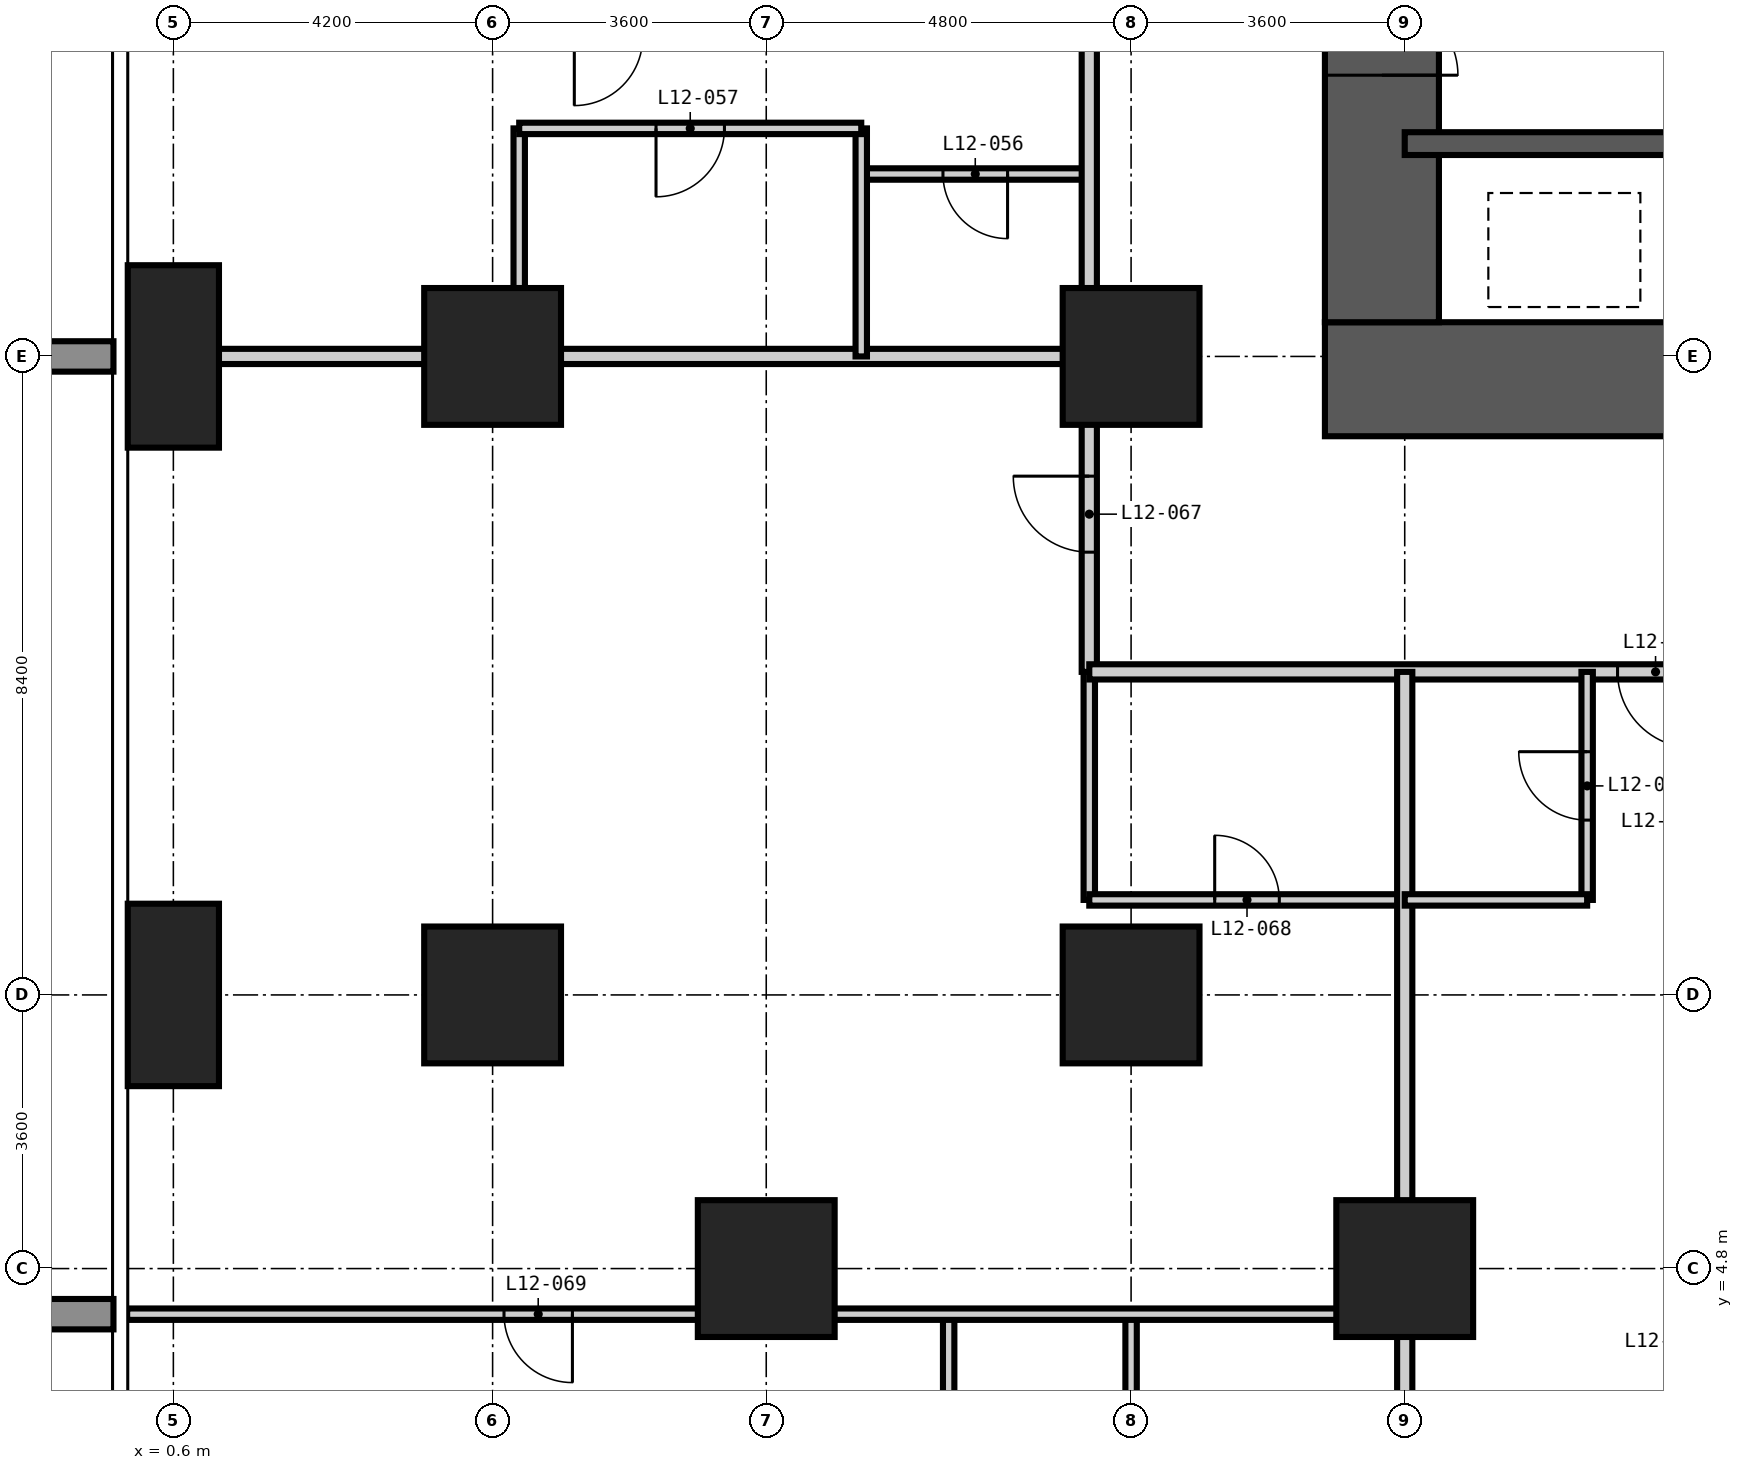
"""IFC4 building model, lengths in metres.
Left out: names, types, materials, properties, quantities, classifications, styles, units other than length and angle.
Written with IfcOpenShell. Run it as: python <this file> out.ifc"""

import sys

from ifc_helpers import new_model, si_unit, direction, frame, frame_2d, origin, origin_2d, place, context, subcontext, project, spatial, rectangle, extrude, element, fill, save


model = new_model("IFC4")
c1 = context("Model", 3, precision=1e-05, world=origin(), true_north=direction((0.0, 1.0)))
c2 = subcontext(c1, "Body", "Model", "MODEL_VIEW")
j1 = project(units=[si_unit("LENGTHUNIT", "METRE"), si_unit("PLANEANGLEUNIT", "RADIAN")], contexts=[c1])
p1 = place(None, origin())
s1 = spatial("IfcSite", under=j1, at=p1, CompositionType="ELEMENT")
p2 = place(p1, origin())
s2 = spatial("IfcBuilding", under=s1, at=p2, CompositionType="ELEMENT")
p3 = place(p2, frame((0.0, 0.0, 52.2)))
s3 = spatial("IfcBuildingStorey", under=s2, at=p3, CompositionType="ELEMENT", Elevation=52.2)
for number, where, z_axis, x_axis in (
    (1, (0.6, 8.4, -0.35), (0.0, 0.0, 1.0), (1.0, 0.0, 0.0)),
    (2, (0.6, 16.8, -0.35), (0.0, 0.0, 1.0), (1.0, 0.0, 0.0)),
):
    element("IfcColumn", number, at=place(p3, frame(where, z_axis=z_axis, x_axis=x_axis)), inside=s3, PredefinedType="COLUMN", context=c2, shape_type="SweptSolid", body=[
        extrude(rectangle(XDim=1.2, YDim=2.4, at=origin_2d()), origin(), (0.0, 0.0, 1.0), 3.6),
    ])
for number, where, z_axis, x_axis in (
    (3, (4.8, 8.4, -0.35), (0.0, 0.0, 1.0), (1.0, 0.0, 0.0)),
    (4, (4.8, 16.8, -0.35), (0.0, 0.0, 1.0), (1.0, 0.0, 0.0)),
    (5, (8.4, 4.8, -0.35), (0.0, 0.0, 1.0), (1.0, 0.0, 0.0)),
    (6, (13.2, 8.4, -0.35), (0.0, 0.0, 1.0), (1.0, 0.0, 0.0)),
    (7, (13.2, 16.8, -0.35), (0.0, 0.0, 1.0), (1.0, 0.0, 0.0)),
    (8, (16.8, 4.8, -0.35), (0.0, 0.0, 1.0), (1.0, 0.0, 0.0)),
):
    element("IfcColumn", number, at=place(p3, frame(where, z_axis=z_axis, x_axis=x_axis)), inside=s3, PredefinedType="COLUMN", context=c2, shape_type="SweptSolid", body=[
        extrude(rectangle(XDim=1.8, YDim=1.8, at=origin_2d()), origin(), (0.0, 0.0, 1.0), 3.6),
    ])
p4 = place(p3, frame((15.75, 16.5, -0.35), z_axis=(0.0, 0.0, 1.0), x_axis=(1.0, 0.0, 0.0)))
e9 = element("IfcWall", 9, at=p4, inside=s3, PredefinedType="SHEAR", context=c2, shape_type="SweptSolid", body=[
    extrude(rectangle(XDim=27.3, YDim=1.5, at=frame_2d((13.65, 0.0))), origin(), (0.0, 0.0, 1.0), 3.6),
])
p5 = place(p4, frame((13.15, 0.0, 0.35)))
e10 = element("IfcOpeningElement", 10, at=p5, cuts=e9, PredefinedType="OPENING", context=c2, shape_type="SweptSolid", body=[
    extrude(rectangle(XDim=1.0, YDim=2.1, at=frame_2d((0.5, 1.05))), frame((0.0, 0.76, 0.0), z_axis=(0.0, -1.0, 0.0), x_axis=(1.0, 0.0, 0.0)), (0.0, 0.0, 1.0), 1.52),
])
p6 = place(p4, frame((19.45, 0.0, 0.35)))
e11 = element("IfcOpeningElement", 11, at=p6, cuts=e9, PredefinedType="OPENING", context=c2, shape_type="SweptSolid", body=[
    extrude(rectangle(XDim=1.0, YDim=2.1, at=frame_2d((0.5, 1.05))), frame((0.0, 0.76, 0.0), z_axis=(0.0, -1.0, 0.0), x_axis=(1.0, 0.0, 0.0)), (0.0, 0.0, 1.0), 1.52),
])
p7 = place(p3, frame((16.5, 41.55, -0.35), z_axis=(0.0, 0.0, 1.0), x_axis=(0.0, -1.0, 0.0)))
e12 = element("IfcWall", 12, at=p7, inside=s3, PredefinedType="SHEAR", context=c2, shape_type="SweptSolid", body=[
    extrude(rectangle(XDim=24.3, YDim=1.5, at=frame_2d((12.15, 0.0))), origin(), (0.0, 0.0, 1.0), 3.6),
])
p8 = place(p7, frame((11.25, 0.0, 0.35)))
e13 = element("IfcOpeningElement", 13, at=p8, cuts=e12, PredefinedType="OPENING", context=c2, shape_type="SweptSolid", body=[
    extrude(rectangle(XDim=1.8, YDim=2.2, at=frame_2d((0.9, 1.1))), frame((0.0, 0.76, 0.0), z_axis=(0.0, -1.0, 0.0), x_axis=(1.0, 0.0, 0.0)), (0.0, 0.0, 1.0), 1.52),
])
p9 = place(p7, frame((20.05, 0.0, 0.35)))
e14 = element("IfcOpeningElement", 14, at=p9, cuts=e12, PredefinedType="OPENING", context=c2, shape_type="SweptSolid", body=[
    extrude(rectangle(XDim=1.0, YDim=2.1, at=frame_2d((0.5, 1.05))), frame((0.0, 0.76, 0.0), z_axis=(0.0, -1.0, 0.0), x_axis=(1.0, 0.0, 0.0)), (0.0, 0.0, 1.0), 1.52),
])
p10 = place(p7, frame((5.35, 0.0, 0.35)))
e15 = element("IfcOpeningElement", 15, at=p10, cuts=e12, PredefinedType="OPENING", context=c2, shape_type="SweptSolid", body=[
    extrude(rectangle(XDim=1.0, YDim=2.1, at=frame_2d((0.5, 1.05))), frame((0.0, 0.76, 0.0), z_axis=(0.0, -1.0, 0.0), x_axis=(1.0, 0.0, 0.0)), (0.0, 0.0, 1.0), 1.52),
])
p11 = place(p3, frame((16.8, 19.6, -0.35), z_axis=(0.0, 0.0, 1.0), x_axis=(1.0, 0.0, 0.0)))
e16 = element("IfcWall", 16, at=p11, inside=s3, PredefinedType="SHEAR", context=c2, shape_type="SweptSolid", body=[
    extrude(rectangle(XDim=8.4, YDim=0.3, at=frame_2d((4.2, 0.0))), origin(), (0.0, 0.0, 1.0), 3.6),
])
p12 = place(p3, frame((12.65, 9.65, 0.0), z_axis=(0.0, 0.0, 1.0), x_axis=(0.0, 1.0, 0.0)))
e17 = element("IfcWall", 17, at=p12, inside=s3, PredefinedType="PARTITIONING", context=c2, shape_type="SweptSolid", body=[
    extrude(rectangle(XDim=3.0, YDim=0.15, at=frame_2d((1.5, 0.0))), origin(), (0.0, 0.0, 1.0), 3.25),
])
p13 = place(p3, frame((12.65, 9.65, 0.0), z_axis=(0.0, 0.0, 1.0), x_axis=(1.0, 0.0, 0.0)))
e18 = element("IfcWall", 18, at=p13, inside=s3, PredefinedType="PARTITIONING", context=c2, shape_type="SweptSolid", body=[
    extrude(rectangle(XDim=4.15, YDim=0.15, at=frame_2d((2.075, 0.0))), origin(), (0.0, 0.0, 1.0), 3.25),
])
p14 = place(p13, frame((1.65, 0.0, 0.0)))
e19 = element("IfcOpeningElement", 19, at=p14, cuts=e18, PredefinedType="OPENING", context=c2, shape_type="SweptSolid", body=[
    extrude(rectangle(XDim=0.85, YDim=2.1, at=frame_2d((0.425, 1.05))), frame((0.0, 0.085, 0.0), z_axis=(0.0, -1.0, 0.0), x_axis=(1.0, 0.0, 0.0)), (0.0, 0.0, 1.0), 0.17),
])
p15 = place(p3, frame((9.65, 19.2, 0.0), z_axis=(0.0, 0.0, 1.0), x_axis=(1.0, 0.0, 0.0)))
e20 = element("IfcWall", 20, at=p15, inside=s3, PredefinedType="PARTITIONING", context=c2, shape_type="SweptSolid", body=[
    extrude(rectangle(XDim=3.0, YDim=0.15, at=frame_2d((1.5, 0.0))), origin(), (0.0, 0.0, 1.0), 3.25),
])
p16 = place(p15, frame((1.075, 0.0, 0.0)))
e21 = element("IfcOpeningElement", 21, at=p16, cuts=e20, PredefinedType="OPENING", context=c2, shape_type="SweptSolid", body=[
    extrude(rectangle(XDim=0.85, YDim=2.1, at=frame_2d((0.425, 1.05))), frame((0.0, 0.085, 0.0), z_axis=(0.0, -1.0, 0.0), x_axis=(1.0, 0.0, 0.0)), (0.0, 0.0, 1.0), 0.17),
])
p17 = place(p3, frame((12.65, 12.65, 0.0), z_axis=(0.0, 0.0, 1.0), x_axis=(0.0, 1.0, 0.0)))
e22 = element("IfcWall", 22, at=p17, inside=s3, PredefinedType="PARTITIONING", context=c2, shape_type="SweptSolid", body=[
    extrude(rectangle(XDim=32.9, YDim=0.2, at=frame_2d((16.45, 0.0))), origin(), (0.0, 0.0, 1.0), 3.25),
])
p18 = place(p17, frame((8.75, 0.0, 0.0)))
e23 = element("IfcOpeningElement", 23, at=p18, cuts=e22, PredefinedType="OPENING", context=c2, shape_type="SweptSolid", body=[
    extrude(rectangle(XDim=1.0, YDim=2.2, at=frame_2d((0.5, 1.1))), frame((0.0, 0.11, 0.0), z_axis=(0.0, -1.0, 0.0), x_axis=(1.0, 0.0, 0.0)), (0.0, 0.0, 1.0), 0.22),
])
p19 = place(p17, frame((17.0, 0.0, 0.0)))
e24 = element("IfcOpeningElement", 24, at=p19, cuts=e22, PredefinedType="OPENING", context=c2, shape_type="SweptSolid", body=[
    extrude(rectangle(XDim=1.0, YDim=2.2, at=frame_2d((0.5, 1.1))), frame((0.0, 0.11, 0.0), z_axis=(0.0, -1.0, 0.0), x_axis=(1.0, 0.0, 0.0)), (0.0, 0.0, 1.0), 0.22),
])
p20 = place(p17, frame((23.9, 0.0, 0.0)))
e25 = element("IfcOpeningElement", 25, at=p20, cuts=e22, PredefinedType="OPENING", context=c2, shape_type="SweptSolid", body=[
    extrude(rectangle(XDim=1.0, YDim=2.2, at=frame_2d((0.5, 1.1))), frame((0.0, 0.11, 0.0), z_axis=(0.0, -1.0, 0.0), x_axis=(1.0, 0.0, 0.0)), (0.0, 0.0, 1.0), 0.22),
])
p21 = place(p17, frame((25.4, 0.0, 0.0)))
e26 = element("IfcOpeningElement", 26, at=p21, cuts=e22, PredefinedType="OPENING", context=c2, shape_type="SweptSolid", body=[
    extrude(rectangle(XDim=1.0, YDim=2.2, at=frame_2d((0.5, 1.1))), frame((0.0, 0.11, 0.0), z_axis=(0.0, -1.0, 0.0), x_axis=(1.0, 0.0, 0.0)), (0.0, 0.0, 1.0), 0.22),
])
p22 = place(p17, frame((1.575, 0.0, 0.0)))
e27 = element("IfcOpeningElement", 27, at=p22, cuts=e22, PredefinedType="OPENING", context=c2, shape_type="SweptSolid", body=[
    extrude(rectangle(XDim=1.0, YDim=2.2, at=frame_2d((0.5, 1.1))), frame((0.0, 0.11, 0.0), z_axis=(0.0, -1.0, 0.0), x_axis=(1.0, 0.0, 0.0)), (0.0, 0.0, 1.0), 0.22),
])
p23 = place(p17, frame((30.625, 0.0, 0.0)))
e28 = element("IfcOpeningElement", 28, at=p23, cuts=e22, PredefinedType="OPENING", context=c2, shape_type="SweptSolid", body=[
    extrude(rectangle(XDim=1.0, YDim=2.2, at=frame_2d((0.5, 1.1))), frame((0.0, 0.11, 0.0), z_axis=(0.0, -1.0, 0.0), x_axis=(1.0, 0.0, 0.0)), (0.0, 0.0, 1.0), 0.22),
])
p24 = place(p3, frame((44.95, 12.65, 0.0), z_axis=(0.0, 0.0, 1.0), x_axis=(-1.0, 0.0, 0.0)))
e29 = element("IfcWall", 29, at=p24, inside=s3, PredefinedType="PARTITIONING", context=c2, shape_type="SweptSolid", body=[
    extrude(rectangle(XDim=32.3, YDim=0.2, at=frame_2d((16.15, 0.0))), origin(), (0.0, 0.0, 1.0), 3.25),
])
p25 = place(p24, frame((24.35, 0.0, 0.0)))
e30 = element("IfcOpeningElement", 30, at=p25, cuts=e29, PredefinedType="OPENING", context=c2, shape_type="SweptSolid", body=[
    extrude(rectangle(XDim=1.0, YDim=2.2, at=frame_2d((0.5, 1.1))), frame((0.0, 0.11, 0.0), z_axis=(0.0, -1.0, 0.0), x_axis=(1.0, 0.0, 0.0)), (0.0, 0.0, 1.0), 0.22),
])
p26 = place(p24, frame((15.95, 0.0, 0.0)))
e31 = element("IfcOpeningElement", 31, at=p26, cuts=e29, PredefinedType="OPENING", context=c2, shape_type="SweptSolid", body=[
    extrude(rectangle(XDim=1.0, YDim=2.2, at=frame_2d((0.5, 1.1))), frame((0.0, 0.11, 0.0), z_axis=(0.0, -1.0, 0.0), x_axis=(1.0, 0.0, 0.0)), (0.0, 0.0, 1.0), 0.22),
])
p27 = place(p24, frame((7.55, 0.0, 0.0)))
e32 = element("IfcOpeningElement", 32, at=p27, cuts=e29, PredefinedType="OPENING", context=c2, shape_type="SweptSolid", body=[
    extrude(rectangle(XDim=1.0, YDim=2.2, at=frame_2d((0.5, 1.1))), frame((0.0, 0.11, 0.0), z_axis=(0.0, -1.0, 0.0), x_axis=(1.0, 0.0, 0.0)), (0.0, 0.0, 1.0), 0.22),
])
for number, where, z_axis, x_axis in (
    (33, (16.8, -0.008, 0.0), (0.0, 0.0, 1.0), (0.0, 1.0, 0.0)),
    (34, (-0.008, 16.8, 0.0), (0.0, 0.0, 1.0), (1.0, 0.0, 0.0)),
):
    element("IfcWall", number, at=place(p3, frame(where, z_axis=z_axis, x_axis=x_axis)), inside=s3, PredefinedType="PARTITIONING", context=c2, shape_type="SweptSolid", body=[
        extrude(rectangle(XDim=12.658, YDim=0.2, at=frame_2d((6.329, 0.0))), origin(), (0.0, 0.0, 1.0), 3.25),
    ])
for number, where, z_axis, x_axis in (
    (35, (5.15, 16.8, 0.0), (0.0, 0.0, 1.0), (0.0, 1.0, 0.0)),
    (36, (9.65, 16.8, 0.0), (0.0, 0.0, 1.0), (0.0, 1.0, 0.0)),
):
    element("IfcWall", number, at=place(p3, frame(where, z_axis=z_axis, x_axis=x_axis)), inside=s3, PredefinedType="PARTITIONING", context=c2, shape_type="SweptSolid", body=[
        extrude(rectangle(XDim=3.0, YDim=0.15, at=frame_2d((1.5, 0.0))), origin(), (0.0, 0.0, 1.0), 3.25),
    ])
p28 = place(p3, frame((10.8, 1.2, 0.0), z_axis=(0.0, 0.0, 1.0), x_axis=(0.0, 1.0, 0.0)))
e37 = element("IfcWall", 37, at=p28, inside=s3, PredefinedType="PARTITIONING", context=c2, shape_type="SweptSolid", body=[
    extrude(rectangle(XDim=3.0, YDim=0.15, at=frame_2d((1.5, 0.0))), origin(), (0.0, 0.0, 1.0), 3.25),
])
p29 = place(p28, frame((1.05, 0.0, 0.0)))
e38 = element("IfcOpeningElement", 38, at=p29, cuts=e37, PredefinedType="OPENING", context=c2, shape_type="SweptSolid", body=[
    extrude(rectangle(XDim=0.9, YDim=2.1, at=frame_2d((0.45, 1.05))), frame((0.0, 0.085, 0.0), z_axis=(0.0, -1.0, 0.0), x_axis=(1.0, 0.0, 0.0)), (0.0, 0.0, 1.0), 0.17),
])
p30 = place(p3, frame((13.2, 1.2, 0.0), z_axis=(0.0, 0.0, 1.0), x_axis=(0.0, 1.0, 0.0)))
e39 = element("IfcWall", 39, at=p30, inside=s3, PredefinedType="PARTITIONING", context=c2, shape_type="SweptSolid", body=[
    extrude(rectangle(XDim=3.0, YDim=0.15, at=frame_2d((1.5, 0.0))), origin(), (0.0, 0.0, 1.0), 3.25),
])
p31 = place(p3, frame((19.2, 9.65, 0.0), z_axis=(0.0, 0.0, 1.0), x_axis=(0.0, 1.0, 0.0)))
e40 = element("IfcWall", 40, at=p31, inside=s3, PredefinedType="PARTITIONING", context=c2, shape_type="SweptSolid", body=[
    extrude(rectangle(XDim=3.0, YDim=0.15, at=frame_2d((1.5, 0.0))), origin(), (0.0, 0.0, 1.0), 3.25),
])
p32 = place(p31, frame((1.05, 0.0, 0.0)))
e41 = element("IfcOpeningElement", 41, at=p32, cuts=e40, PredefinedType="OPENING", context=c2, shape_type="SweptSolid", body=[
    extrude(rectangle(XDim=0.9, YDim=2.1, at=frame_2d((0.45, 1.05))), frame((0.0, 0.085, 0.0), z_axis=(0.0, -1.0, 0.0), x_axis=(1.0, 0.0, 0.0)), (0.0, 0.0, 1.0), 0.17),
])
p33 = place(p3, frame((-0.008, 4.2, 0.0), z_axis=(0.0, 0.0, 1.0), x_axis=(1.0, 0.0, 0.0)))
e42 = element("IfcWall", 42, at=p33, inside=s3, PredefinedType="PARTITIONING", context=c2, shape_type="SweptSolid", body=[
    extrude(rectangle(XDim=16.808, YDim=0.15, at=frame_2d((8.404, 0.0))), origin(), (0.0, 0.0, 1.0), 3.25),
])
p34 = place(p33, frame((4.958, 0.0, 0.0)))
e43 = element("IfcOpeningElement", 43, at=p34, cuts=e42, PredefinedType="OPENING", context=c2, shape_type="SweptSolid", body=[
    extrude(rectangle(XDim=0.9, YDim=2.1, at=frame_2d((0.45, 1.05))), frame((0.0, 0.085, 0.0), z_axis=(0.0, -1.0, 0.0), x_axis=(1.0, 0.0, 0.0)), (0.0, 0.0, 1.0), 0.17),
])
p35 = place(p3, frame((16.8, 9.65, 0.0), z_axis=(0.0, 0.0, 1.0), x_axis=(1.0, 0.0, 0.0)))
e44 = element("IfcWall", 44, at=p35, inside=s3, PredefinedType="PARTITIONING", context=c2, shape_type="SweptSolid", body=[
    extrude(rectangle(XDim=2.4, YDim=0.15, at=frame_2d((1.2, 0.0))), origin(), (0.0, 0.0, 1.0), 3.25),
])
p36 = place(p3, frame((5.15, 19.8, 0.0), z_axis=(0.0, 0.0, 1.0), x_axis=(1.0, 0.0, 0.0)))
e45 = element("IfcWall", 45, at=p36, inside=s3, PredefinedType="PARTITIONING", context=c2, shape_type="SweptSolid", body=[
    extrude(rectangle(XDim=4.5, YDim=0.15, at=frame_2d((2.25, 0.0))), origin(), (0.0, 0.0, 1.0), 3.25),
])
p37 = place(p36, frame((1.8, 0.0, 0.0)))
e46 = element("IfcOpeningElement", 46, at=p37, cuts=e45, PredefinedType="OPENING", context=c2, shape_type="SweptSolid", body=[
    extrude(rectangle(XDim=0.9, YDim=2.1, at=frame_2d((0.45, 1.05))), frame((0.0, 0.085, 0.0), z_axis=(0.0, -1.0, 0.0), x_axis=(1.0, 0.0, 0.0)), (0.0, 0.0, 1.0), 0.17),
])
p38 = place(p25, origin())
e47 = element("IfcDoor", 47, at=p38, inside=s3, OperationType="SINGLE_SWING_LEFT", PredefinedType="DOOR", context=c2, shape_type="SweptSolid", body=[
    extrude(rectangle(XDim=1.0, YDim=2.2, at=frame_2d((0.5, 1.1))), frame((0.0, 0.025, 0.0), z_axis=(0.0, -1.0, 0.0), x_axis=(1.0, 0.0, 0.0)), (0.0, 0.0, 1.0), 0.05),
])
fill(e30, e47)
p39 = place(p32, origin())
e48 = element("IfcDoor", 48, at=p39, inside=s3, OperationType="SINGLE_SWING_RIGHT", PredefinedType="DOOR", context=c2, shape_type="SweptSolid", body=[
    extrude(rectangle(XDim=0.9, YDim=2.1, at=frame_2d((0.45, 1.05))), frame((0.0, 0.025, 0.0), z_axis=(0.0, -1.0, 0.0), x_axis=(1.0, 0.0, 0.0)), (0.0, 0.0, 1.0), 0.05),
])
fill(e41, e48)
p40 = place(p16, frame((0.85, 0.0, 0.0), z_axis=(0.0, 0.0, 1.0), x_axis=(-1.0, 0.0, 0.0)))
e49 = element("IfcDoor", 49, at=p40, inside=s3, OperationType="SINGLE_SWING_LEFT", PredefinedType="DOOR", context=c2, shape_type="SweptSolid", body=[
    extrude(rectangle(XDim=0.85, YDim=2.1, at=frame_2d((0.425, 1.05))), frame((0.0, 0.025, 0.0), z_axis=(0.0, -1.0, 0.0), x_axis=(1.0, 0.0, 0.0)), (0.0, 0.0, 1.0), 0.05),
])
fill(e21, e49)
p41 = place(p37, frame((0.9, 0.0, 0.0), z_axis=(0.0, 0.0, 1.0), x_axis=(-1.0, 0.0, 0.0)))
e50 = element("IfcDoor", 50, at=p41, inside=s3, OperationType="SINGLE_SWING_RIGHT", PredefinedType="DOOR", context=c2, shape_type="SweptSolid", body=[
    extrude(rectangle(XDim=0.9, YDim=2.1, at=frame_2d((0.45, 1.05))), frame((0.0, 0.025, 0.0), z_axis=(0.0, -1.0, 0.0), x_axis=(1.0, 0.0, 0.0)), (0.0, 0.0, 1.0), 0.05),
])
fill(e46, e50)
p42 = place(p22, origin())
e51 = element("IfcDoor", 51, at=p42, inside=s3, OperationType="SINGLE_SWING_RIGHT", PredefinedType="DOOR", context=c2, shape_type="SweptSolid", body=[
    extrude(rectangle(XDim=1.0, YDim=2.2, at=frame_2d((0.5, 1.1))), frame((0.0, 0.025, 0.0), z_axis=(0.0, -1.0, 0.0), x_axis=(1.0, 0.0, 0.0)), (0.0, 0.0, 1.0), 0.05),
])
fill(e27, e51)
p43 = place(p14, origin())
e52 = element("IfcDoor", 52, at=p43, inside=s3, OperationType="SINGLE_SWING_LEFT", PredefinedType="DOOR", context=c2, shape_type="SweptSolid", body=[
    extrude(rectangle(XDim=0.85, YDim=2.1, at=frame_2d((0.425, 1.05))), frame((0.0, 0.025, 0.0), z_axis=(0.0, -1.0, 0.0), x_axis=(1.0, 0.0, 0.0)), (0.0, 0.0, 1.0), 0.05),
])
fill(e19, e52)
p44 = place(p34, frame((0.9, 0.0, 0.0), z_axis=(0.0, 0.0, 1.0), x_axis=(-1.0, 0.0, 0.0)))
e53 = element("IfcDoor", 53, at=p44, inside=s3, OperationType="SINGLE_SWING_LEFT", PredefinedType="DOOR", context=c2, shape_type="SweptSolid", body=[
    extrude(rectangle(XDim=0.9, YDim=2.1, at=frame_2d((0.45, 1.05))), frame((0.0, 0.025, 0.0), z_axis=(0.0, -1.0, 0.0), x_axis=(1.0, 0.0, 0.0)), (0.0, 0.0, 1.0), 0.05),
])
fill(e43, e53)
p45 = place(p9, origin())
e54 = element("IfcDoor", 54, at=p45, inside=s3, OperationType="SINGLE_SWING_RIGHT", PredefinedType="DOOR", context=c2, shape_type="SweptSolid", body=[
    extrude(rectangle(XDim=1.0, YDim=2.1, at=frame_2d((0.5, 1.05))), frame((0.0, 0.025, 0.0), z_axis=(0.0, -1.0, 0.0), x_axis=(1.0, 0.0, 0.0)), (0.0, 0.0, 1.0), 0.05),
])
fill(e14, e54)
save(model, sys.argv[1])
